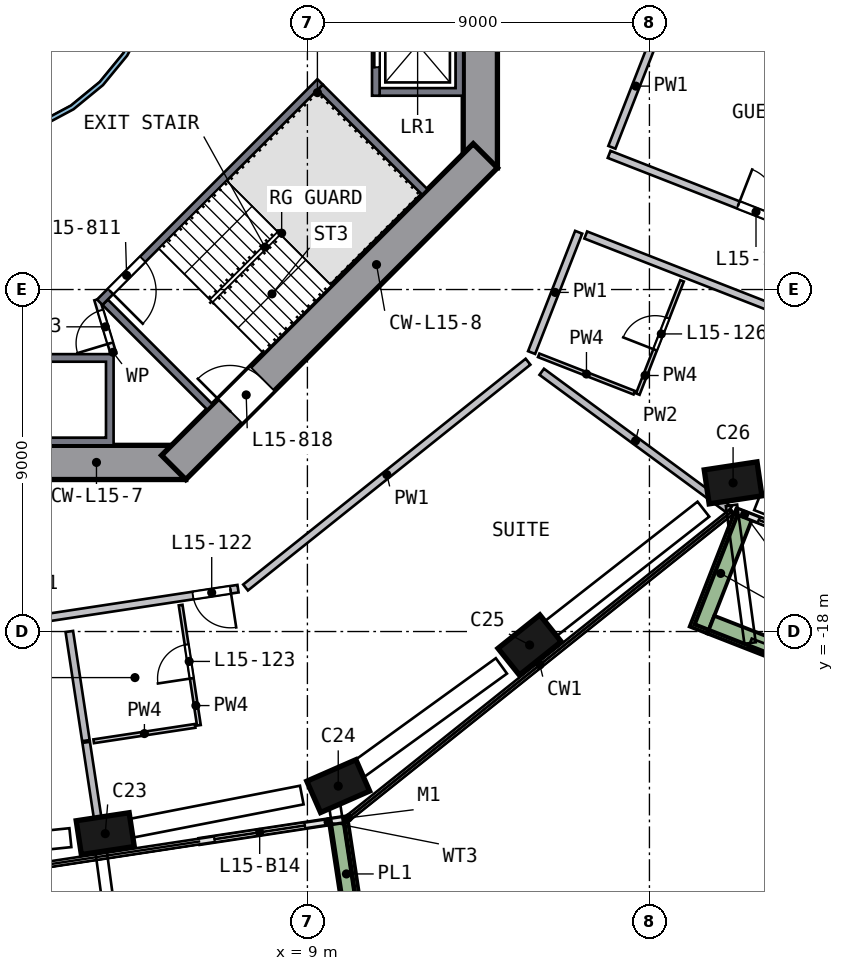
"""IFC4 building model, lengths in metres.
Left out: names, types, materials, properties, quantities, classifications, styles, units other than length and angle.
Written with IfcOpenShell. Run it as: python <this file> out.ifc"""

import sys

from ifc_helpers import new_model, si_unit, direction, frame, frame_2d, origin, origin_2d, place, context, subcontext, project, spatial, polyline, rectangle, outline, extrude, element, fill, save


model = new_model("IFC4")
c1 = context("Model", 3, precision=1e-05, world=origin(), true_north=direction((0.0, 1.0)))
c2 = subcontext(c1, "Body", "Model", "MODEL_VIEW")
j1 = project(units=[si_unit("LENGTHUNIT", "METRE"), si_unit("PLANEANGLEUNIT", "RADIAN")], contexts=[c1])
p1 = place(None, origin())
s1 = spatial("IfcSite", under=j1, at=p1, CompositionType="ELEMENT")
p2 = place(p1, origin())
s2 = spatial("IfcBuilding", under=s1, at=p2, CompositionType="ELEMENT")
p3 = place(p2, frame((0.0, 0.0, 68.0)))
s3 = spatial("IfcBuildingStorey", under=s2, at=p3, CompositionType="ELEMENT", Elevation=68.0)
p4 = place(p3, frame((3.547, -23.34, 0.0), z_axis=(0.110881458, 0.01779579, 0.993674299), x_axis=(0.982419922, 0.149132846, -0.112296444)))
e1 = element("IfcColumn", 1, at=p4, inside=s3, PredefinedType="COLUMN", context=c2, shape_type="SweptSolid", body=[
    extrude(rectangle(XDim=1.4, YDim=0.9, at=origin_2d()), origin(), (0.0, 0.0, 1.0), 3.21),
])
p5 = place(p3, frame((9.684, -22.125, 0.0), z_axis=(0.104842615, 0.046909277, 0.993381873), x_axis=(-0.910169761, -0.397994334, 0.114854325)))
e2 = element("IfcColumn", 2, at=p5, inside=s3, PredefinedType="COLUMN", context=c2, shape_type="SweptSolid", body=[
    extrude(rectangle(XDim=1.4, YDim=0.9, at=origin_2d()), origin(), (0.0, 0.0, 1.0), 3.211),
])
p6 = place(p3, frame((14.742, -18.44, 0.0), z_axis=(0.087077907, 0.070879135, 0.993676802), x_axis=(0.775945613, 0.620727709, -0.112274296)))
e3 = element("IfcColumn", 3, at=p6, inside=s3, PredefinedType="COLUMN", context=c2, shape_type="SweptSolid", body=[
    extrude(rectangle(XDim=1.4, YDim=0.9, at=origin_2d()), origin(), (0.0, 0.0, 1.0), 3.21),
])
p7 = place(p3, frame((20.121, -14.204, 0.0), z_axis=(0.066659307, 0.096226548, 0.99312486), x_axis=(-0.986410674, -0.143446042, 0.08010752)))
e4 = element("IfcColumn", 4, at=p7, inside=s3, PredefinedType="COLUMN", context=c2, shape_type="SweptSolid", body=[
    extrude(rectangle(XDim=1.4, YDim=0.9, at=origin_2d()), origin(), (0.0, 0.0, 1.0), 3.212),
])
p8 = place(p3, frame((13.55, -5.799, 0.0), z_axis=(0.0, 0.0, 1.0), x_axis=(0.0, 1.0, 0.0)))
e5 = element("IfcWall", 5, at=p8, inside=s3, PredefinedType="SHEAR", context=c2, shape_type="SweptSolid", body=[
    extrude(rectangle(XDim=11.598, YDim=0.9, at=frame_2d((5.799, 0.0))), origin(), (0.0, 0.0, 1.0), 3.5),
])
p9 = place(p8, frame((4.899, 0.0, 0.0)))
e6 = element("IfcOpeningElement", 6, at=p9, cuts=e5, PredefinedType="OPENING", context=c2, shape_type="SweptSolid", body=[
    extrude(rectangle(XDim=1.8, YDim=2.1, at=frame_2d((0.9, 1.05))), frame((0.0, 0.46, 0.0), z_axis=(0.0, -1.0, 0.0), x_axis=(1.0, 0.0, 0.0)), (0.0, 0.0, 1.0), 0.92),
])
p10 = place(p3, frame((-5.799, -13.55, 0.0), z_axis=(0.0, 0.0, 1.0), x_axis=(1.0, 0.0, 0.0)))
e7 = element("IfcWall", 7, at=p10, inside=s3, PredefinedType="SHEAR", context=c2, shape_type="SweptSolid", body=[
    extrude(rectangle(XDim=11.598, YDim=0.9, at=frame_2d((5.799, 0.0))), origin(), (0.0, 0.0, 1.0), 3.5),
])
p11 = place(p10, frame((4.899, 0.0, 0.0)))
e8 = element("IfcOpeningElement", 8, at=p11, cuts=e7, PredefinedType="OPENING", context=c2, shape_type="SweptSolid", body=[
    extrude(rectangle(XDim=1.8, YDim=2.1, at=frame_2d((0.9, 1.05))), frame((0.0, 0.46, 0.0), z_axis=(0.0, -1.0, 0.0), x_axis=(1.0, 0.0, 0.0)), (0.0, 0.0, 1.0), 0.92),
])
p12 = place(p3, frame((5.481, -13.682, 0.0), z_axis=(0.0, 0.0, 1.0), x_axis=(0.707106781, 0.707106781, 0.0)))
e9 = element("IfcWall", 9, at=p12, inside=s3, PredefinedType="SHEAR", context=c2, shape_type="SweptSolid", body=[
    extrude(rectangle(XDim=11.598, YDim=0.9, at=frame_2d((5.799, 0.0))), origin(), (0.0, 0.0, 1.0), 3.5),
])
p13 = place(p12, frame((2.099, 0.0, 0.0)))
e10 = element("IfcOpeningElement", 10, at=p13, cuts=e9, PredefinedType="OPENING", context=c2, shape_type="SweptSolid", body=[
    extrude(rectangle(XDim=1.2, YDim=2.1, at=frame_2d((0.6, 1.05))), frame((0.0, 0.46, 0.0), z_axis=(0.0, -1.0, 0.0), x_axis=(1.0, 0.0, 0.0)), (0.0, 0.0, 1.0), 0.92),
])
p14 = place(p3, frame((6.162, -23.525, 0.0), z_axis=(0.0, 0.0, 1.0), x_axis=(0.988650664, 0.150232704, 0.0)))
e11 = element("IfcWall", 11, at=p14, inside=s3, PredefinedType="SOLIDWALL", context=c2, shape_type="SweptSolid", body=[
    extrude(rectangle(XDim=3.842, YDim=0.15, at=frame_2d((1.921, 0.0))), origin(), (0.0, 0.0, 1.0), 2.425),
])
p15 = place(p14, frame((0.4, 0.0, 0.0)))
e12 = element("IfcOpeningElement", 12, at=p15, cuts=e11, PredefinedType="OPENING", context=c2, shape_type="SweptSolid", body=[
    extrude(rectangle(XDim=2.4, YDim=2.4, at=frame_2d((1.2, 1.2))), frame((0.0, 0.085, 0.0), z_axis=(0.0, -1.0, 0.0), x_axis=(1.0, 0.0, 0.0)), (0.0, 0.0, 1.0), 0.17),
])
p16 = place(p3, frame((20.317, -14.845, 0.0), z_axis=(0.0, 0.0, 1.0), x_axis=(0.931316194, -0.364211677, 0.0)))
e13 = element("IfcWall", 13, at=p16, inside=s3, PredefinedType="SOLIDWALL", context=c2, shape_type="SweptSolid", body=[
    extrude(rectangle(XDim=2.502, YDim=0.15, at=frame_2d((1.251, 0.0))), origin(), (0.0, 0.0, 1.0), 2.425),
])
p17 = place(p16, frame((0.602, 0.0, 0.0)))
e14 = element("IfcOpeningElement", 14, at=p17, cuts=e13, PredefinedType="OPENING", context=c2, shape_type="SweptSolid", body=[
    extrude(rectangle(XDim=1.5, YDim=2.4, at=frame_2d((0.75, 1.2))), frame((0.0, 0.085, 0.0), z_axis=(0.0, -1.0, 0.0), x_axis=(1.0, 0.0, 0.0)), (0.0, 0.0, 1.0), 0.17),
])
p18 = place(p3, frame((10.229, -25.713, 0.0), z_axis=(0.0, 0.0, 1.0), x_axis=(-0.150255557, 0.988647191, 0.0)))
e15 = element("IfcWall", 15, at=p18, inside=s3, PredefinedType="SOLIDWALL", context=c2, shape_type="SweptSolid", body=[
    extrude(rectangle(XDim=2.699, YDim=0.5, at=frame_2d((1.349, 0.0))), origin(), (0.0, 0.0, 1.0), 0.7),
])
p19 = place(p3, frame((20.457, -14.981, 0.0), z_axis=(0.0, 0.0, 1.0), x_axis=(-0.364261223, -0.931296817, 0.0)))
e16 = element("IfcWall", 16, at=p19, inside=s3, PredefinedType="SOLIDWALL", context=c2, shape_type="SweptSolid", body=[
    extrude(rectangle(XDim=3.199, YDim=0.5, at=frame_2d((1.6, 0.0))), origin(), (0.0, 0.0, 1.0), 0.7),
])
p20 = place(p3, frame((19.616, -17.819, 0.0), z_axis=(0.0, 0.0, 1.0), x_axis=(0.9313182, -0.36420655, 0.0)))
e17 = element("IfcWall", 17, at=p20, inside=s3, PredefinedType="SOLIDWALL", context=c2, shape_type="SweptSolid", body=[
    extrude(rectangle(XDim=8.738, YDim=0.5, at=frame_2d((4.369, 0.0))), origin(), (0.0, 0.0, 1.0), 0.7),
])
p21 = place(p3, origin())
e18 = element("IfcWall", 18, at=p21, inside=s3, PredefinedType="SOLIDWALL", context=c2, shape_type="SweptSolid", body=[
    extrude(outline(polyline([(13.1, -3.9), (10.9, -3.9), (10.9, -3.7), (12.9, -3.7), (12.9, -1.4), (10.9, -1.4), (10.9, -1.2), (13.1, -1.2), (13.1, -3.9)])), origin(), (0.0, 0.0, 1.0), 3.19),
])
p22 = place(p3, frame((10.8, -1.2, 0.0), z_axis=(0.0, 0.0, 1.0), x_axis=(0.0, -1.0, 0.0)))
e19 = element("IfcWall", 19, at=p22, inside=s3, PredefinedType="SOLIDWALL", context=c2, shape_type="SweptSolid", body=[
    extrude(rectangle(XDim=2.7, YDim=0.2, at=frame_2d((1.35, 0.0))), origin(), (0.0, 0.0, 1.0), 3.19),
])
p23 = place(p22, frame((0.75, 0.0, 0.0)))
e20 = element("IfcOpeningElement", 20, at=p23, cuts=e19, PredefinedType="OPENING", context=c2, shape_type="SweptSolid", body=[
    extrude(rectangle(XDim=1.2, YDim=2.1, at=frame_2d((0.6, 1.05))), frame((0.0, 0.11, 0.0), z_axis=(0.0, -1.0, 0.0), x_axis=(1.0, 0.0, 0.0)), (0.0, 0.0, 1.0), 0.22),
])
p24 = place(p3, origin())
e21 = element("IfcWall", 21, at=p24, inside=s3, PredefinedType="SOLIDWALL", context=c2, shape_type="SweptSolid", body=[
    extrude(outline(polyline([(3.9, -10.7), (3.9, -13.1), (1.2, -13.1), (1.2, -10.7), (3.9, -10.7)]), holes=[polyline([(1.4, -12.9), (3.7, -12.9), (3.7, -10.9), (1.4, -10.9), (1.4, -12.9)])]), origin(), (0.0, 0.0, 1.0), 3.19),
])
p25 = place(p3, frame((9.334, -3.535, 0.0), z_axis=(0.0, 0.0, 1.0), x_axis=(-0.707106781, -0.707106781, 0.0)))
e22 = element("IfcWall", 22, at=p25, inside=s3, PredefinedType="SOLIDWALL", context=c2, shape_type="SweptSolid", body=[
    extrude(rectangle(XDim=8.2, YDim=0.2, at=frame_2d((4.1, 0.0))), origin(), (0.0, 0.0, 1.0), 3.19),
])
p26 = place(p25, frame((6.6, 0.0, 0.0)))
e23 = element("IfcOpeningElement", 23, at=p26, cuts=e22, PredefinedType="OPENING", context=c2, shape_type="SweptSolid", body=[
    extrude(rectangle(XDim=1.2, YDim=2.1, at=frame_2d((0.6, 1.05))), frame((0.0, 0.11, 0.0), z_axis=(0.0, -1.0, 0.0), x_axis=(1.0, 0.0, 0.0)), (0.0, 0.0, 1.0), 0.22),
])
for number, where, z_axis, x_axis in (
    (24, (3.677, -9.334, 0.0), (0.0, 0.0, 1.0), (0.707, -0.707, 0.0)),
    (25, (9.334, -3.677, 0.0), (0.0, 0.0, 1.0), (0.707, -0.707, 0.0)),
):
    element("IfcWall", number, at=place(p3, frame(where, z_axis=z_axis, x_axis=x_axis)), inside=s3, PredefinedType="SOLIDWALL", context=c2, shape_type="SweptSolid", body=[
        extrude(rectangle(XDim=3.9, YDim=0.2, at=frame_2d((1.95, 0.0))), origin(), (0.0, 0.0, 1.0), 3.19),
    ])
p27 = place(p3, frame((3.9, -10.7, 0.0), z_axis=(0.0, 0.0, 1.0), x_axis=(-0.289808785, 0.957084567, 0.0)))
e26 = element("IfcWall", 26, at=p27, inside=s3, PredefinedType="PARTITIONING", context=c2, shape_type="SweptSolid", body=[
    extrude(rectangle(XDim=1.501, YDim=0.15, at=frame_2d((0.75, 0.0))), origin(), (0.0, 0.0, 1.0), 3.19),
])
p28 = place(p27, frame((0.301, 0.0, 0.0)))
e27 = element("IfcOpeningElement", 27, at=p28, cuts=e26, PredefinedType="OPENING", context=c2, shape_type="SweptSolid", body=[
    extrude(rectangle(XDim=0.9, YDim=2.1, at=frame_2d((0.45, 1.05))), frame((0.0, 0.085, 0.0), z_axis=(0.0, -1.0, 0.0), x_axis=(1.0, 0.0, 0.0)), (0.0, 0.0, 1.0), 0.17),
])
p29 = place(p3, origin())
e28 = element("IfcWall", 28, at=p29, inside=s3, PredefinedType="SOLIDWALL", context=c2, shape_type="SweptSolid", body=[
    extrude(outline(polyline([(5.021, -0.999), (4.73, -1.959), (4.257, -2.844), (3.62, -3.62), (2.844, -4.257), (1.959, -4.73), (0.999, -5.021), (0.0, -5.12), (-0.999, -5.021), (-1.959, -4.73), (-2.844, -4.257), (-3.62, -3.62), (-4.257, -2.844), (-4.73, -1.959), (-5.021, -0.999), (-5.12, 0.0), (-5.021, 0.999), (-4.73, 1.959), (-4.257, 2.844), (-3.62, 3.62), (-2.844, 4.257), (-1.959, 4.73), (-0.999, 5.021), (0.0, 5.12), (0.999, 5.021), (1.959, 4.73), (2.844, 4.257), (3.62, 3.62), (4.257, 2.844), (4.73, 1.959), (5.021, 0.999), (5.12, 0.0), (5.021, -0.999)]), holes=[polyline([(4.904, 0.976), (4.619, 1.913), (4.157, 2.778), (3.535, 3.535), (2.778, 4.157), (1.913, 4.619), (0.976, 4.904), (0.0, 5.0), (-0.976, 4.904), (-1.913, 4.619), (-2.778, 4.157), (-3.535, 3.535), (-4.157, 2.778), (-4.619, 1.913), (-4.904, 0.976), (-5.0, 0.0), (-4.904, -0.976), (-4.619, -1.913), (-4.157, -2.778), (-3.535, -3.535), (-2.778, -4.157), (-1.913, -4.619), (-0.976, -4.904), (0.0, -5.0), (0.976, -4.904), (1.913, -4.619), (2.778, -4.157), (3.535, -3.535), (4.157, -2.778), (4.619, -1.913), (4.904, -0.976), (5.0, 0.0), (4.904, 0.976)])]), origin(), (0.0, 0.0, 1.0), 3.19),
])
p30 = place(p3, frame((7.174, -16.872, 0.0), z_axis=(0.0, 0.0, 1.0), x_axis=(-0.988652066, -0.150223477, 0.0)))
e29 = element("IfcWall", 29, at=p30, inside=s3, PredefinedType="SOLIDWALL", context=c2, shape_type="SweptSolid", body=[
    extrude(rectangle(XDim=9.116, YDim=0.2, at=frame_2d((4.558, 0.0))), origin(), (0.0, 0.0, 1.0), 3.19),
])
p31 = place(p30, frame((0.2, 0.0, 0.0)))
e30 = element("IfcOpeningElement", 30, at=p31, cuts=e29, PredefinedType="OPENING", context=c2, shape_type="SweptSolid", body=[
    extrude(rectangle(XDim=1.0, YDim=2.1, at=frame_2d((0.5, 1.05))), frame((0.0, 0.11, 0.0), z_axis=(0.0, -1.0, 0.0), x_axis=(1.0, 0.0, 0.0)), (0.0, 0.0, 1.0), 0.22),
])
p32 = place(p3, frame((7.373, -16.842, 0.0), z_axis=(0.0, 0.0, 1.0), x_axis=(0.78109403, 0.624413418, 0.0)))
e31 = element("IfcWall", 31, at=p32, inside=s3, PredefinedType="SOLIDWALL", context=c2, shape_type="SweptSolid", body=[
    extrude(rectangle(XDim=9.516, YDim=0.2, at=frame_2d((4.758, 0.0))), origin(), (0.0, 0.0, 1.0), 3.19),
])
p33 = place(p3, frame((14.899, -10.659, 0.0), z_axis=(0.0, 0.0, 1.0), x_axis=(0.364261269, 0.931296799, 0.0)))
e32 = element("IfcWall", 32, at=p33, inside=s3, PredefinedType="SOLIDWALL", context=c2, shape_type="SweptSolid", body=[
    extrude(rectangle(XDim=3.4, YDim=0.2, at=frame_2d((1.7, 0.0))), origin(), (0.0, 0.0, 1.0), 3.19),
])
p34 = place(p3, frame((17.012, -5.257, 0.0), z_axis=(0.0, 0.0, 1.0), x_axis=(0.364210349, 0.931316714, 0.0)))
e33 = element("IfcWall", 33, at=p34, inside=s3, PredefinedType="SOLIDWALL", context=c2, shape_type="SweptSolid", body=[
    extrude(rectangle(XDim=3.458, YDim=0.2, at=frame_2d((1.729, 0.0))), origin(), (0.0, 0.0, 1.0), 3.19),
])
p35 = place(p3, frame((30.795, -13.225, 0.0), z_axis=(0.0, 0.0, 1.0), x_axis=(-0.931306749, 0.364235828, 0.0)))
e34 = element("IfcWall", 34, at=p35, inside=s3, PredefinedType="SOLIDWALL", context=c2, shape_type="SweptSolid", body=[
    extrude(rectangle(XDim=15.538, YDim=0.2, at=frame_2d((7.769, 0.0))), origin(), (0.0, 0.0, 1.0), 3.19),
])
p36 = place(p35, frame((1.8, 0.0, 0.0)))
e35 = element("IfcOpeningElement", 35, at=p36, cuts=e34, PredefinedType="OPENING", context=c2, shape_type="SweptSolid", body=[
    extrude(rectangle(XDim=1.0, YDim=2.1, at=frame_2d((0.5, 1.05))), frame((0.0, 0.11, 0.0), z_axis=(0.0, -1.0, 0.0), x_axis=(1.0, 0.0, 0.0)), (0.0, 0.0, 1.0), 0.22),
])
p37 = place(p3, frame((16.939, -5.444, 0.0), z_axis=(0.0, 0.0, 1.0), x_axis=(0.931312079, -0.3642222, 0.0)))
e36 = element("IfcWall", 36, at=p37, inside=s3, PredefinedType="SOLIDWALL", context=c2, shape_type="SweptSolid", body=[
    extrude(rectangle(XDim=15.538, YDim=0.2, at=frame_2d((7.769, 0.0))), origin(), (0.0, 0.0, 1.0), 3.19),
])
p38 = place(p37, frame((3.65, 0.0, 0.0)))
e37 = element("IfcOpeningElement", 37, at=p38, cuts=e36, PredefinedType="OPENING", context=c2, shape_type="SweptSolid", body=[
    extrude(rectangle(XDim=1.0, YDim=2.1, at=frame_2d((0.5, 1.05))), frame((0.0, 0.11, 0.0), z_axis=(0.0, -1.0, 0.0), x_axis=(1.0, 0.0, 0.0)), (0.0, 0.0, 1.0), 0.22),
])
p39 = place(p3, frame((2.735, -17.999, 0.0), z_axis=(0.0, 0.0, 1.0), x_axis=(0.15027592, -0.988644096, 0.0)))
e38 = element("IfcWall", 38, at=p39, inside=s3, PredefinedType="SOLIDWALL", context=c2, shape_type="SweptSolid", body=[
    extrude(rectangle(XDim=2.905, YDim=0.2, at=frame_2d((1.452, 0.0))), origin(), (0.0, 0.0, 1.0), 3.19),
])
p40 = place(p3, frame((3.178, -20.916, 0.0), z_axis=(0.0, 0.0, 1.0), x_axis=(0.150192463, -0.988656778, 0.0)))
e39 = element("IfcWall", 39, at=p40, inside=s3, PredefinedType="SOLIDWALL", context=c2, shape_type="SweptSolid", body=[
    extrude(rectangle(XDim=2.952, YDim=0.2, at=frame_2d((1.476, 0.0))), origin(), (0.0, 0.0, 1.0), 3.19),
])
p41 = place(p3, frame((15.166, -11.165, 0.0), z_axis=(0.0, 0.0, 1.0), x_axis=(0.805323948, -0.592835002, 0.0)))
e40 = element("IfcWall", 40, at=p41, inside=s3, PredefinedType="SOLIDWALL", context=c2, shape_type="SweptSolid", body=[
    extrude(rectangle(XDim=6.132, YDim=0.2, at=frame_2d((3.066, 0.0))), origin(), (0.0, 0.0, 1.0), 3.19),
])
p42 = place(p3, frame((6.046, -20.483, 0.0), z_axis=(0.0, 0.0, 1.0), x_axis=(-0.988657395, -0.150188397, 0.0)))
e41 = element("IfcWall", 41, at=p42, inside=s3, PredefinedType="PARTITIONING", context=c2, shape_type="SweptSolid", body=[
    extrude(rectangle(XDim=2.7, YDim=0.1, at=frame_2d((1.35, 0.0))), origin(), (0.0, 0.0, 1.0), 3.19),
])
p43 = place(p3, frame((6.145, -20.468, 0.0), z_axis=(0.0, 0.0, 1.0), x_axis=(-0.150228011, 0.988651377, 0.0)))
e42 = element("IfcWall", 42, at=p43, inside=s3, PredefinedType="PARTITIONING", context=c2, shape_type="SweptSolid", body=[
    extrude(rectangle(XDim=3.2, YDim=0.1, at=frame_2d((1.6, 0.0))), origin(), (0.0, 0.0, 1.0), 3.19),
])
p44 = place(p43, frame((1.25, 0.0, 0.0)))
e43 = element("IfcOpeningElement", 43, at=p44, cuts=e42, PredefinedType="OPENING", context=c2, shape_type="SweptSolid", body=[
    extrude(rectangle(XDim=0.9, YDim=2.1, at=frame_2d((0.45, 1.05))), frame((0.0, 0.06, 0.0), z_axis=(0.0, -1.0, 0.0), x_axis=(1.0, 0.0, 0.0)), (0.0, 0.0, 1.0), 0.12),
])
p45 = place(p3, frame((15.086, -10.732, 0.0), z_axis=(0.0, 0.0, 1.0), x_axis=(0.931317467, -0.364208423, 0.0)))
e44 = element("IfcWall", 44, at=p45, inside=s3, PredefinedType="PARTITIONING", context=c2, shape_type="SweptSolid", body=[
    extrude(rectangle(XDim=2.7, YDim=0.1, at=frame_2d((1.35, 0.0))), origin(), (0.0, 0.0, 1.0), 3.19),
])
p46 = place(p3, frame((17.693, -11.752, 0.0), z_axis=(0.0, 0.0, 1.0), x_axis=(0.364223868, 0.931311427, 0.0)))
e45 = element("IfcWall", 45, at=p46, inside=s3, PredefinedType="PARTITIONING", context=c2, shape_type="SweptSolid", body=[
    extrude(rectangle(XDim=3.2, YDim=0.1, at=frame_2d((1.6, 0.0))), origin(), (0.0, 0.0, 1.0), 3.19),
])
p47 = place(p46, frame((1.25, 0.0, 0.0)))
e46 = element("IfcOpeningElement", 46, at=p47, cuts=e45, PredefinedType="OPENING", context=c2, shape_type="SweptSolid", body=[
    extrude(rectangle(XDim=0.9, YDim=2.1, at=frame_2d((0.45, 1.05))), frame((0.0, 0.06, 0.0), z_axis=(0.0, -1.0, 0.0), x_axis=(1.0, 0.0, 0.0)), (0.0, 0.0, 1.0), 0.12),
])
p48 = place(p15, origin())
e47 = element("IfcDoor", 47, at=p48, inside=s3, OperationType="SLIDING_TO_RIGHT", PredefinedType="DOOR", context=c2, shape_type="SweptSolid", body=[
    extrude(rectangle(XDim=2.4, YDim=2.4, at=frame_2d((1.2, 1.2))), frame((0.0, 0.025, 0.0), z_axis=(0.0, -1.0, 0.0), x_axis=(1.0, 0.0, 0.0)), (0.0, 0.0, 1.0), 0.05),
])
fill(e12, e47)
p49 = place(p17, origin())
e48 = element("IfcDoor", 48, at=p49, inside=s3, OperationType="SLIDING_TO_LEFT", PredefinedType="DOOR", context=c2, shape_type="SweptSolid", body=[
    extrude(rectangle(XDim=1.5, YDim=2.4, at=frame_2d((0.75, 1.2))), frame((0.0, 0.025, 0.0), z_axis=(0.0, -1.0, 0.0), x_axis=(1.0, 0.0, 0.0)), (0.0, 0.0, 1.0), 0.05),
])
fill(e14, e48)
p50 = place(p23, origin())
e49 = element("IfcDoor", 49, at=p50, inside=s3, OperationType="DOUBLE_DOOR_SLIDING", PredefinedType="DOOR", context=c2, shape_type="SweptSolid", body=[
    extrude(rectangle(XDim=1.2, YDim=2.1, at=frame_2d((0.6, 1.05))), frame((0.0, 0.025, 0.0), z_axis=(0.0, -1.0, 0.0), x_axis=(1.0, 0.0, 0.0)), (0.0, 0.0, 1.0), 0.05),
])
fill(e20, e49)
p51 = place(p26, origin())
e50 = element("IfcDoor", 50, at=p51, inside=s3, OperationType="SINGLE_SWING_RIGHT", PredefinedType="DOOR", context=c2, shape_type="SweptSolid", body=[
    extrude(rectangle(XDim=1.2, YDim=2.1, at=frame_2d((0.6, 1.05))), frame((0.0, 0.025, 0.0), z_axis=(0.0, -1.0, 0.0), x_axis=(1.0, 0.0, 0.0)), (0.0, 0.0, 1.0), 0.05),
])
fill(e23, e50)
p52 = place(p13, origin())
e51 = element("IfcDoor", 51, at=p52, inside=s3, OperationType="SINGLE_SWING_LEFT", PredefinedType="DOOR", context=c2, shape_type="SweptSolid", body=[
    extrude(rectangle(XDim=1.2, YDim=2.1, at=frame_2d((0.6, 1.05))), frame((0.0, 0.025, 0.0), z_axis=(0.0, -1.0, 0.0), x_axis=(1.0, 0.0, 0.0)), (0.0, 0.0, 1.0), 0.05),
])
fill(e10, e51)
p53 = place(p28, origin())
e52 = element("IfcDoor", 52, at=p53, inside=s3, OperationType="SINGLE_SWING_LEFT", PredefinedType="DOOR", context=c2, shape_type="SweptSolid", body=[
    extrude(rectangle(XDim=0.9, YDim=2.1, at=frame_2d((0.45, 1.05))), frame((0.0, 0.025, 0.0), z_axis=(0.0, -1.0, 0.0), x_axis=(1.0, 0.0, 0.0)), (0.0, 0.0, 1.0), 0.05),
])
fill(e27, e52)
p54 = place(p31, origin())
e53 = element("IfcDoor", 53, at=p54, inside=s3, OperationType="SINGLE_SWING_LEFT", PredefinedType="DOOR", context=c2, shape_type="SweptSolid", body=[
    extrude(rectangle(XDim=1.0, YDim=2.1, at=frame_2d((0.5, 1.05))), frame((0.0, 0.025, 0.0), z_axis=(0.0, -1.0, 0.0), x_axis=(1.0, 0.0, 0.0)), (0.0, 0.0, 1.0), 0.05),
])
fill(e30, e53)
p55 = place(p44, origin())
e54 = element("IfcDoor", 54, at=p55, inside=s3, OperationType="SINGLE_SWING_LEFT", PredefinedType="DOOR", context=c2, shape_type="SweptSolid", body=[
    extrude(rectangle(XDim=0.9, YDim=2.1, at=frame_2d((0.45, 1.05))), frame((0.0, 0.025, 0.0), z_axis=(0.0, -1.0, 0.0), x_axis=(1.0, 0.0, 0.0)), (0.0, 0.0, 1.0), 0.05),
])
fill(e43, e54)
p56 = place(p47, origin())
e55 = element("IfcDoor", 55, at=p56, inside=s3, OperationType="SINGLE_SWING_LEFT", PredefinedType="DOOR", context=c2, shape_type="SweptSolid", body=[
    extrude(rectangle(XDim=0.9, YDim=2.1, at=frame_2d((0.45, 1.05))), frame((0.0, 0.025, 0.0), z_axis=(0.0, -1.0, 0.0), x_axis=(1.0, 0.0, 0.0)), (0.0, 0.0, 1.0), 0.05),
])
fill(e46, e55)
p57 = place(p38, origin())
e56 = element("IfcDoor", 56, at=p57, inside=s3, OperationType="SINGLE_SWING_LEFT", PredefinedType="DOOR", context=c2, shape_type="SweptSolid", body=[
    extrude(rectangle(XDim=1.0, YDim=2.1, at=frame_2d((0.5, 1.05))), frame((0.0, 0.025, 0.0), z_axis=(0.0, -1.0, 0.0), x_axis=(1.0, 0.0, 0.0)), (0.0, 0.0, 1.0), 0.05),
])
fill(e37, e56)
save(model, sys.argv[1])
